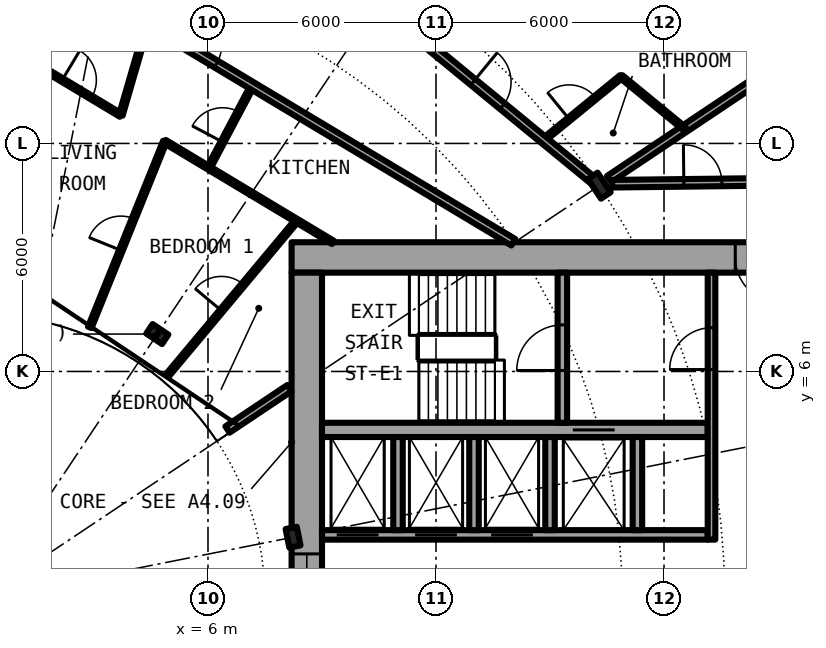
"""IFC4 building model, lengths in metres.
Left out: names, types, materials, properties, quantities, classifications, styles, units other than length and angle.
Written with IfcOpenShell. Run it as: python <this file> out.ifc"""

import sys

from ifc_helpers import new_model, si_unit, direction, frame, frame_2d, origin, origin_2d, place, context, subcontext, project, spatial, rectangle, i_section, extrude, element, fill, save


model = new_model("IFC4")
c1 = context("Model", 3, precision=1e-05, world=origin(), true_north=direction((0.0, 1.0)))
c2 = subcontext(c1, "Body", "Model", "MODEL_VIEW")
j1 = project(units=[si_unit("LENGTHUNIT", "METRE"), si_unit("PLANEANGLEUNIT", "RADIAN")], contexts=[c1])
p1 = place(None, origin())
s1 = spatial("IfcSite", under=j1, at=p1, CompositionType="ELEMENT")
p2 = place(p1, origin())
s2 = spatial("IfcBuilding", under=s1, at=p2, CompositionType="ELEMENT")
p3 = place(p2, frame((0.0, 0.0, 50.25)))
s3 = spatial("IfcBuildingStorey", under=s2, at=p3, CompositionType="ELEMENT", Elevation=50.25)
p4 = place(p3, frame((16.297, 10.889, 0.0), z_axis=(0.0, 0.0, 1.0), x_axis=(0.831469612303, 0.55557023302, 0.0)))
e1 = element("IfcColumn", 1, at=p4, inside=s3, PredefinedType="COLUMN", context=c2, shape_type="SweptSolid", body=[
    extrude(i_section(OverallWidth=0.305, OverallDepth=0.62, WebThickness=0.021, FlangeThickness=0.04, FilletRadius=0.027, at=origin_2d()), origin(), (0.0, 0.0, 1.0), 3.05),
])
for number, where, z_axis, x_axis in (
    (2, (8.239, 1.639, 0.0), (0.0, 0.0, 1.0), (0.981, 0.195, 0.0)),
    (3, (4.667, 6.984, 0.0), (0.0, 0.0, 1.0), (0.556, 0.831, 0.0)),
):
    element("IfcColumn", number, at=place(p3, frame(where, z_axis=z_axis, x_axis=x_axis)), inside=s3, PredefinedType="COLUMN", context=c2, shape_type="SweptSolid", body=[
        extrude(i_section(OverallWidth=0.3, OverallDepth=0.5, WebThickness=0.014, FlangeThickness=0.028, FilletRadius=0.027, at=origin_2d()), origin(), (0.0, 0.0, 1.0), 3.05),
    ])
p5 = place(p3, frame((22.4, 9.0, 0.0), z_axis=(0.0, 0.0, 1.0), x_axis=(-1.0, 0.0, 0.0)))
e4 = element("IfcWall", 4, at=p5, inside=s3, PredefinedType="SHEAR", context=c2, shape_type="SweptSolid", body=[
    extrude(rectangle(XDim=14.2, YDim=0.8, at=frame_2d((7.1, 0.0))), origin(), (0.0, 0.0, 1.0), 3.05),
])
p6 = place(p5, frame((1.325, 0.0, 0.0)))
e5 = element("IfcOpeningElement", 5, at=p6, cuts=e4, PredefinedType="OPENING", context=c2, shape_type="SweptSolid", body=[
    extrude(rectangle(XDim=1.2, YDim=2.3, at=frame_2d((0.6, 1.15))), frame((0.0, 0.41, 0.0), z_axis=(0.0, -1.0, 0.0), x_axis=(1.0, 0.0, 0.0)), (0.0, 0.0, 1.0), 0.82),
])
p7 = place(p3, frame((8.6, -8.6, 0.0), z_axis=(0.0, 0.0, 1.0), x_axis=(0.0, 1.0, 0.0)))
e6 = element("IfcWall", 6, at=p7, inside=s3, PredefinedType="SHEAR", context=c2, shape_type="SweptSolid", body=[
    extrude(rectangle(XDim=17.2, YDim=0.8, at=frame_2d((8.6, 0.0))), origin(), (0.0, 0.0, 1.0), 3.05),
])
p8 = place(p7, frame((7.4, 0.0, 0.1)))
e7 = element("IfcOpeningElement", 7, at=p8, cuts=e6, PredefinedType="OPENING", context=c2, shape_type="SweptSolid", body=[
    extrude(rectangle(XDim=2.4, YDim=2.2, at=frame_2d((1.2, 1.1))), frame((0.0, 0.41, 0.0), z_axis=(0.0, -1.0, 0.0), x_axis=(1.0, 0.0, 0.0)), (0.0, 0.0, 1.0), 0.82),
])
p9 = place(p3, frame((9.0, 1.7, 0.0), z_axis=(0.0, 0.0, 1.0), x_axis=(1.0, 0.0, 0.0)))
e8 = element("IfcWall", 8, at=p9, inside=s3, PredefinedType="SHEAR", context=c2, shape_type="SweptSolid", body=[
    extrude(rectangle(XDim=10.15, YDim=0.25, at=frame_2d((5.075, 0.0))), origin(), (0.0, 0.0, 1.0), 3.05),
])
p10 = place(p9, frame((0.387, 0.0, 0.0)))
e9 = element("IfcOpeningElement", 9, at=p10, cuts=e8, PredefinedType="OPENING", context=c2, shape_type="SweptSolid", body=[
    extrude(rectangle(XDim=1.1, YDim=2.3, at=frame_2d((0.55, 1.15))), frame((0.0, 0.135, 0.0), z_axis=(0.0, -1.0, 0.0), x_axis=(1.0, 0.0, 0.0)), (0.0, 0.0, 1.0), 0.27),
])
p11 = place(p9, frame((2.45, 0.0, 0.0)))
e10 = element("IfcOpeningElement", 10, at=p11, cuts=e8, PredefinedType="OPENING", context=c2, shape_type="SweptSolid", body=[
    extrude(rectangle(XDim=1.1, YDim=2.3, at=frame_2d((0.55, 1.15))), frame((0.0, 0.135, 0.0), z_axis=(0.0, -1.0, 0.0), x_axis=(1.0, 0.0, 0.0)), (0.0, 0.0, 1.0), 0.27),
])
p12 = place(p9, frame((4.45, 0.0, 0.0)))
e11 = element("IfcOpeningElement", 11, at=p12, cuts=e8, PredefinedType="OPENING", context=c2, shape_type="SweptSolid", body=[
    extrude(rectangle(XDim=1.1, YDim=2.3, at=frame_2d((0.55, 1.15))), frame((0.0, 0.135, 0.0), z_axis=(0.0, -1.0, 0.0), x_axis=(1.0, 0.0, 0.0)), (0.0, 0.0, 1.0), 0.27),
])
p13 = place(p3, frame((9.0, 4.462, 0.0), z_axis=(0.0, 0.0, 1.0), x_axis=(1.0, 0.0, 0.0)))
e12 = element("IfcWall", 12, at=p13, inside=s3, PredefinedType="SHEAR", context=c2, shape_type="SweptSolid", body=[
    extrude(rectangle(XDim=10.15, YDim=0.375, at=frame_2d((5.075, 0.0))), origin(), (0.0, 0.0, 1.0), 3.05),
])
p14 = place(p13, frame((6.6, 0.0, 0.0)))
e13 = element("IfcOpeningElement", 13, at=p14, cuts=e12, PredefinedType="OPENING", context=c2, shape_type="SweptSolid", body=[
    extrude(rectangle(XDim=1.1, YDim=2.3, at=frame_2d((0.55, 1.15))), frame((0.0, 0.198, 0.0), z_axis=(0.0, -1.0, 0.0), x_axis=(1.0, 0.0, 0.0)), (0.0, 0.0, 1.0), 0.395),
])
p15 = place(p3, frame((15.325, 4.65, 0.0), z_axis=(0.0, 0.0, 1.0), x_axis=(0.0, 1.0, 0.0)))
e14 = element("IfcWall", 14, at=p15, inside=s3, PredefinedType="SHEAR", context=c2, shape_type="SweptSolid", body=[
    extrude(rectangle(XDim=3.95, YDim=0.25, at=frame_2d((1.975, 0.0))), origin(), (0.0, 0.0, 1.0), 3.05),
])
p16 = place(p15, frame((1.375, 0.0, 0.0)))
e15 = element("IfcOpeningElement", 15, at=p16, cuts=e14, PredefinedType="OPENING", context=c2, shape_type="SweptSolid", body=[
    extrude(rectangle(XDim=1.2, YDim=2.3, at=frame_2d((0.6, 1.15))), frame((0.0, 0.135, 0.0), z_axis=(0.0, -1.0, 0.0), x_axis=(1.0, 0.0, 0.0)), (0.0, 0.0, 1.0), 0.27),
])
for number, where, z_axis, x_axis in (
    (16, (15.0, 1.825, 0.0), (0.0, 0.0, 1.0), (0.0, 1.0, 0.0)),
    (17, (17.3, 1.825, 0.0), (0.0, 0.0, 1.0), (0.0, 1.0, 0.0)),
):
    element("IfcWall", number, at=place(p3, frame(where, z_axis=z_axis, x_axis=x_axis)), inside=s3, PredefinedType="SOLIDWALL", context=c2, shape_type="SweptSolid", body=[
        extrude(rectangle(XDim=2.45, YDim=0.25, at=frame_2d((1.225, 0.0))), origin(), (0.0, 0.0, 1.0), 2.7),
    ])
p17 = place(p3, frame((19.25, 1.575, 0.0), z_axis=(0.0, 0.0, 1.0), x_axis=(0.0, 1.0, 0.0)))
e18 = element("IfcWall", 18, at=p17, inside=s3, PredefinedType="SOLIDWALL", context=c2, shape_type="SweptSolid", body=[
    extrude(rectangle(XDim=7.025, YDim=0.2, at=frame_2d((3.513, 0.0))), origin(), (0.0, 0.0, 1.0), 2.7),
])
p18 = place(p17, frame((4.475, 0.0, 0.0)))
e19 = element("IfcOpeningElement", 19, at=p18, cuts=e18, PredefinedType="OPENING", context=c2, shape_type="SweptSolid", body=[
    extrude(rectangle(XDim=1.1, YDim=2.3, at=frame_2d((0.55, 1.15))), frame((0.0, 0.11, 0.0), z_axis=(0.0, -1.0, 0.0), x_axis=(1.0, 0.0, 0.0)), (0.0, 0.0, 1.0), 0.22),
])
for number, where, z_axis, x_axis in (
    (20, (11.0, 1.825, 0.0), (0.0, 0.0, 1.0), (0.0, 1.0, 0.0)),
    (21, (13.0, 1.825, 0.0), (0.0, 0.0, 1.0), (0.0, 1.0, 0.0)),
):
    element("IfcWall", number, at=place(p3, frame(where, z_axis=z_axis, x_axis=x_axis)), inside=s3, PredefinedType="SOLIDWALL", context=c2, shape_type="SweptSolid", body=[
        extrude(rectangle(XDim=2.45, YDim=0.25, at=frame_2d((1.225, 0.0))), origin(), (0.0, 0.0, 1.0), 2.7),
    ])
p19 = place(p3, frame((2.889, 7.159, 0.0), z_axis=(0.0, 0.0, 1.0), x_axis=(0.374372761824, 0.927278294367, 0.0)))
e22 = element("IfcWall", 22, at=p19, inside=s3, PredefinedType="PARTITIONING", context=c2, shape_type="SweptSolid", body=[
    extrude(rectangle(XDim=5.276, YDim=0.1, at=frame_2d((2.638, 0.0))), origin(), (0.0, 0.0, 1.0), 2.7),
])
p20 = place(p19, frame((2.188, 0.0, 0.0)))
e23 = element("IfcOpeningElement", 23, at=p20, cuts=e22, PredefinedType="OPENING", context=c2, shape_type="SweptSolid", body=[
    extrude(rectangle(XDim=0.9, YDim=2.3, at=frame_2d((0.45, 1.15))), frame((0.0, 0.06, 0.0), z_axis=(0.0, -1.0, 0.0), x_axis=(1.0, 0.0, 0.0)), (0.0, 0.0, 1.0), 0.12),
])
p21 = place(p3, frame((3.706, 12.744, 0.0), z_axis=(0.0, 0.0, 1.0), x_axis=(0.279201466266, 0.960232545395, 0.0)))
e24 = element("IfcWall", 24, at=p21, inside=s3, PredefinedType="PARTITIONING", context=c2, shape_type="SweptSolid", body=[
    extrude(rectangle(XDim=2.524, YDim=0.1, at=frame_2d((1.262, 0.0))), origin(), (0.0, 0.0, 1.0), 2.7),
])
p22 = place(p3, frame((4.952, 5.923, 0.0), z_axis=(0.0, 0.0, 1.0), x_axis=(0.641376424834, 0.767226356213, 0.0)))
e25 = element("IfcWall", 25, at=p22, inside=s3, PredefinedType="PARTITIONING", context=c2, shape_type="SweptSolid", body=[
    extrude(rectangle(XDim=5.275, YDim=0.1, at=frame_2d((2.637, 0.0))), origin(), (0.0, 0.0, 1.0), 2.7),
])
p23 = place(p22, frame((2.187, 0.0, 0.0)))
e26 = element("IfcOpeningElement", 26, at=p23, cuts=e25, PredefinedType="OPENING", context=c2, shape_type="SweptSolid", body=[
    extrude(rectangle(XDim=0.9, YDim=2.3, at=frame_2d((0.45, 1.15))), frame((0.0, 0.06, 0.0), z_axis=(0.0, -1.0, 0.0), x_axis=(1.0, 0.0, 0.0)), (0.0, 0.0, 1.0), 0.12),
])
p24 = place(p3, frame((6.021, 11.357, 0.0), z_axis=(0.0, 0.0, 1.0), x_axis=(0.468337293896, 0.883549760425, 0.0)))
e27 = element("IfcWall", 27, at=p24, inside=s3, PredefinedType="PARTITIONING", context=c2, shape_type="SweptSolid", body=[
    extrude(rectangle(XDim=2.445, YDim=0.1, at=frame_2d((1.222, 0.0))), origin(), (0.0, 0.0, 1.0), 2.7),
])
p25 = place(p24, frame((0.772, 0.0, 0.0)))
e28 = element("IfcOpeningElement", 28, at=p25, cuts=e27, PredefinedType="OPENING", context=c2, shape_type="SweptSolid", body=[
    extrude(rectangle(XDim=0.9, YDim=2.3, at=frame_2d((0.45, 1.15))), frame((0.0, 0.06, 0.0), z_axis=(0.0, -1.0, 0.0), x_axis=(1.0, 0.0, 0.0)), (0.0, 0.0, 1.0), 0.12),
])
p26 = place(p3, frame((14.831, 12.092, 0.0), z_axis=(0.0, 0.0, 1.0), x_axis=(0.774979608522, 0.631986239072, 0.0)))
e29 = element("IfcWall", 29, at=p26, inside=s3, PredefinedType="PARTITIONING", context=c2, shape_type="SweptSolid", body=[
    extrude(rectangle(XDim=2.636, YDim=0.1, at=frame_2d((1.318, 0.0))), origin(), (0.0, 0.0, 1.0), 2.7),
])
p27 = place(p26, frame((0.868, 0.0, 0.0)))
e30 = element("IfcOpeningElement", 30, at=p27, cuts=e29, PredefinedType="OPENING", context=c2, shape_type="SweptSolid", body=[
    extrude(rectangle(XDim=0.9, YDim=2.3, at=frame_2d((0.45, 1.15))), frame((0.0, 0.06, 0.0), z_axis=(0.0, -1.0, 0.0), x_axis=(1.0, 0.0, 0.0)), (0.0, 0.0, 1.0), 0.12),
])
p28 = place(p3, frame((16.555, 11.061, 0.0), z_axis=(0.0, 0.0, 1.0), x_axis=(0.831403467378, 0.55566921314, 0.0)))
e31 = element("IfcWall", 31, at=p28, inside=s3, PredefinedType="PARTITIONING", context=c2, shape_type="SweptSolid", body=[
    extrude(rectangle(XDim=7.265, YDim=0.2, at=frame_2d((3.632, 0.0))), origin(), (0.0, 0.0, 1.0), 2.7),
])
p29 = place(p3, frame((6.513, 4.472, 0.0), z_axis=(0.0, 0.0, 1.0), x_axis=(0.831417956244, 0.555647533996, 0.0)))
e32 = element("IfcWall", 32, at=p29, inside=s3, PredefinedType="PARTITIONING", context=c2, shape_type="SweptSolid", body=[
    extrude(rectangle(XDim=1.962, YDim=0.2, at=frame_2d((0.981, 0.0))), origin(), (0.0, 0.0, 1.0), 2.7),
])
p30 = place(p3, frame((16.636, 10.94, 0.0), z_axis=(0.0, 0.0, 1.0), x_axis=(0.999928980998, 0.011917758204, 0.0)))
e33 = element("IfcWall", 33, at=p30, inside=s3, PredefinedType="PARTITIONING", context=c2, shape_type="SweptSolid", body=[
    extrude(rectangle(XDim=5.039, YDim=0.2, at=frame_2d((2.52, 0.0))), origin(), (0.0, 0.0, 1.0), 2.7),
])
p31 = place(p30, frame((1.886, 0.0, 0.0)))
e34 = element("IfcOpeningElement", 34, at=p31, cuts=e33, PredefinedType="OPENING", context=c2, shape_type="SweptSolid", body=[
    extrude(rectangle(XDim=1.0, YDim=2.3, at=frame_2d((0.5, 1.15))), frame((0.0, 0.11, 0.0), z_axis=(0.0, -1.0, 0.0), x_axis=(1.0, 0.0, 0.0)), (0.0, 0.0, 1.0), 0.22),
])
p32 = place(p3, frame((1.392, 14.132, 0.0), z_axis=(0.0, 0.0, 1.0), x_axis=(0.857524856518, -0.514442533674, 0.0)))
e35 = element("IfcWall", 35, at=p32, inside=s3, PredefinedType="PARTITIONING", context=c2, shape_type="SweptSolid", body=[
    extrude(rectangle(XDim=2.698, YDim=0.1, at=frame_2d((1.349, 0.0))), origin(), (0.0, 0.0, 1.0), 2.7),
])
p33 = place(p32, frame((0.899, 0.0, 0.0)))
e36 = element("IfcOpeningElement", 36, at=p33, cuts=e35, PredefinedType="OPENING", context=c2, shape_type="SweptSolid", body=[
    extrude(rectangle(XDim=0.9, YDim=2.3, at=frame_2d((0.45, 1.15))), frame((0.0, 0.06, 0.0), z_axis=(0.0, -1.0, 0.0), x_axis=(1.0, 0.0, 0.0)), (0.0, 0.0, 1.0), 0.12),
])
p34 = place(p3, frame((4.863, 12.05, 0.0), z_axis=(0.0, 0.0, 1.0), x_axis=(0.857576410704, -0.51435658818, 0.0)))
e37 = element("IfcWall", 37, at=p34, inside=s3, PredefinedType="PARTITIONING", context=c2, shape_type="SweptSolid", body=[
    extrude(rectangle(XDim=5.16, YDim=0.1, at=frame_2d((2.58, 0.0))), origin(), (0.0, 0.0, 1.0), 2.7),
])
p35 = place(p3, frame((1.658, 16.819, 0.0), z_axis=(0.0, 0.0, 1.0), x_axis=(0.857688434449, -0.514169767113, 0.0)))
e38 = element("IfcWall", 38, at=p35, inside=s3, PredefinedType="PARTITIONING", context=c2, shape_type="SweptSolid", body=[
    extrude(rectangle(XDim=14.429, YDim=0.2, at=frame_2d((7.215, 0.0))), origin(), (0.0, 0.0, 1.0), 2.7),
])
p36 = place(p35, frame((4.316, 0.0, 0.0)))
e39 = element("IfcOpeningElement", 39, at=p36, cuts=e38, PredefinedType="OPENING", context=c2, shape_type="SweptSolid", body=[
    extrude(rectangle(XDim=1.0, YDim=2.3, at=frame_2d((0.5, 1.15))), frame((0.0, 0.11, 0.0), z_axis=(0.0, -1.0, 0.0), x_axis=(1.0, 0.0, 0.0)), (0.0, 0.0, 1.0), 0.22),
])
p37 = place(p3, frame((7.5, 18.108, 0.0), z_axis=(0.0, 0.0, 1.0), x_axis=(0.773041360816, -0.634355621452, 0.0)))
e40 = element("IfcWall", 40, at=p37, inside=s3, PredefinedType="PARTITIONING", context=c2, shape_type="SweptSolid", body=[
    extrude(rectangle(XDim=11.221, YDim=0.2, at=frame_2d((5.61, 0.0))), origin(), (0.0, 0.0, 1.0), 2.38),
])
p38 = place(p37, frame((7.083, 0.0, 0.0)))
e41 = element("IfcOpeningElement", 41, at=p38, cuts=e40, PredefinedType="OPENING", context=c2, shape_type="SweptSolid", body=[
    extrude(rectangle(XDim=1.0, YDim=2.3, at=frame_2d((0.5, 1.15))), frame((0.0, 0.11, 0.0), z_axis=(0.0, -1.0, 0.0), x_axis=(1.0, 0.0, 0.0)), (0.0, 0.0, 1.0), 0.22),
])
p39 = place(p3, frame((16.874, 13.758, 0.0), z_axis=(0.0, 0.0, 1.0), x_axis=(0.772948171844, -0.634469166818, 0.0)))
e42 = element("IfcWall", 42, at=p39, inside=s3, PredefinedType="PARTITIONING", context=c2, shape_type="SweptSolid", body=[
    extrude(rectangle(XDim=2.158, YDim=0.1, at=frame_2d((1.079, 0.0))), origin(), (0.0, 0.0, 1.0), 2.7),
])
p40 = place(p10, origin())
e43 = element("IfcDoor", 43, at=p40, inside=s3, OperationType="DOUBLE_DOOR_SLIDING", PredefinedType="DOOR", context=c2, shape_type="SweptSolid", body=[
    extrude(rectangle(XDim=1.1, YDim=2.3, at=frame_2d((0.55, 1.15))), frame((0.0, 0.025, 0.0), z_axis=(0.0, -1.0, 0.0), x_axis=(1.0, 0.0, 0.0)), (0.0, 0.0, 1.0), 0.05),
])
fill(e9, e43)
p41 = place(p11, origin())
e44 = element("IfcDoor", 44, at=p41, inside=s3, OperationType="DOUBLE_DOOR_SLIDING", PredefinedType="DOOR", context=c2, shape_type="SweptSolid", body=[
    extrude(rectangle(XDim=1.1, YDim=2.3, at=frame_2d((0.55, 1.15))), frame((0.0, 0.025, 0.0), z_axis=(0.0, -1.0, 0.0), x_axis=(1.0, 0.0, 0.0)), (0.0, 0.0, 1.0), 0.05),
])
fill(e10, e44)
p42 = place(p12, origin())
e45 = element("IfcDoor", 45, at=p42, inside=s3, OperationType="DOUBLE_DOOR_SLIDING", PredefinedType="DOOR", context=c2, shape_type="SweptSolid", body=[
    extrude(rectangle(XDim=1.1, YDim=2.3, at=frame_2d((0.55, 1.15))), frame((0.0, 0.025, 0.0), z_axis=(0.0, -1.0, 0.0), x_axis=(1.0, 0.0, 0.0)), (0.0, 0.0, 1.0), 0.05),
])
fill(e11, e45)
p43 = place(p14, origin())
e46 = element("IfcDoor", 46, at=p43, inside=s3, OperationType="DOUBLE_DOOR_SLIDING", PredefinedType="DOOR", context=c2, shape_type="SweptSolid", body=[
    extrude(rectangle(XDim=1.1, YDim=2.3, at=frame_2d((0.55, 1.15))), frame((0.0, 0.025, 0.0), z_axis=(0.0, -1.0, 0.0), x_axis=(1.0, 0.0, 0.0)), (0.0, 0.0, 1.0), 0.05),
])
fill(e13, e46)
p44 = place(p16, origin())
e47 = element("IfcDoor", 47, at=p44, inside=s3, OperationType="SINGLE_SWING_LEFT", PredefinedType="DOOR", context=c2, shape_type="SweptSolid", body=[
    extrude(rectangle(XDim=1.2, YDim=2.3, at=frame_2d((0.6, 1.15))), frame((0.0, 0.025, 0.0), z_axis=(0.0, -1.0, 0.0), x_axis=(1.0, 0.0, 0.0)), (0.0, 0.0, 1.0), 0.05),
])
fill(e15, e47)
p45 = place(p18, origin())
e48 = element("IfcDoor", 48, at=p45, inside=s3, OperationType="SINGLE_SWING_LEFT", PredefinedType="DOOR", context=c2, shape_type="SweptSolid", body=[
    extrude(rectangle(XDim=1.1, YDim=2.3, at=frame_2d((0.55, 1.15))), frame((0.0, 0.025, 0.0), z_axis=(0.0, -1.0, 0.0), x_axis=(1.0, 0.0, 0.0)), (0.0, 0.0, 1.0), 0.05),
])
fill(e19, e48)
p46 = place(p6, origin())
e49 = element("IfcDoor", 49, at=p46, inside=s3, OperationType="SINGLE_SWING_RIGHT", PredefinedType="DOOR", context=c2, shape_type="SweptSolid", body=[
    extrude(rectangle(XDim=1.2, YDim=2.3, at=frame_2d((0.6, 1.15))), frame((0.0, 0.025, 0.0), z_axis=(0.0, -1.0, 0.0), x_axis=(1.0, 0.0, 0.0)), (0.0, 0.0, 1.0), 0.05),
])
fill(e5, e49)
p47 = place(p8, origin())
e50 = element("IfcWindow", 50, at=p47, inside=s3, PartitioningType="SINGLE_PANEL", PredefinedType="WINDOW", context=c2, shape_type="SweptSolid", body=[
    extrude(rectangle(XDim=2.4, YDim=2.2, at=frame_2d((1.2, 1.1))), frame((0.0, 0.03, 0.0), z_axis=(0.0, -1.0, 0.0), x_axis=(1.0, 0.0, 0.0)), (0.0, 0.0, 1.0), 0.06),
])
fill(e7, e50)
p48 = place(p38, origin())
e51 = element("IfcDoor", 51, at=p48, inside=s3, OperationType="SINGLE_SWING_RIGHT", PredefinedType="DOOR", context=c2, shape_type="SweptSolid", body=[
    extrude(rectangle(XDim=1.0, YDim=2.3, at=frame_2d((0.5, 1.15))), frame((0.0, 0.025, 0.0), z_axis=(0.0, -1.0, 0.0), x_axis=(1.0, 0.0, 0.0)), (0.0, 0.0, 1.0), 0.05),
])
fill(e41, e51)
p49 = place(p27, origin())
e52 = element("IfcDoor", 52, at=p49, inside=s3, OperationType="SINGLE_SWING_RIGHT", PredefinedType="DOOR", context=c2, shape_type="SweptSolid", body=[
    extrude(rectangle(XDim=0.9, YDim=2.3, at=frame_2d((0.45, 1.15))), frame((0.0, 0.025, 0.0), z_axis=(0.0, -1.0, 0.0), x_axis=(1.0, 0.0, 0.0)), (0.0, 0.0, 1.0), 0.05),
])
fill(e30, e52)
p50 = place(p36, origin())
e53 = element("IfcDoor", 53, at=p50, inside=s3, OperationType="SINGLE_SWING_LEFT", PredefinedType="DOOR", context=c2, shape_type="SweptSolid", body=[
    extrude(rectangle(XDim=1.0, YDim=2.3, at=frame_2d((0.5, 1.15))), frame((0.0, 0.025, 0.0), z_axis=(0.0, -1.0, 0.0), x_axis=(1.0, 0.0, 0.0)), (0.0, 0.0, 1.0), 0.05),
])
fill(e39, e53)
p51 = place(p33, origin())
e54 = element("IfcDoor", 54, at=p51, inside=s3, OperationType="SINGLE_SWING_RIGHT", PredefinedType="DOOR", context=c2, shape_type="SweptSolid", body=[
    extrude(rectangle(XDim=0.9, YDim=2.3, at=frame_2d((0.45, 1.15))), frame((0.0, 0.025, 0.0), z_axis=(0.0, -1.0, 0.0), x_axis=(1.0, 0.0, 0.0)), (0.0, 0.0, 1.0), 0.05),
])
fill(e36, e54)
p52 = place(p25, origin())
e55 = element("IfcDoor", 55, at=p52, inside=s3, OperationType="SINGLE_SWING_RIGHT", PredefinedType="DOOR", context=c2, shape_type="SweptSolid", body=[
    extrude(rectangle(XDim=0.9, YDim=2.3, at=frame_2d((0.45, 1.15))), frame((0.0, 0.025, 0.0), z_axis=(0.0, -1.0, 0.0), x_axis=(1.0, 0.0, 0.0)), (0.0, 0.0, 1.0), 0.05),
])
fill(e28, e55)
p53 = place(p20, origin())
e56 = element("IfcDoor", 56, at=p53, inside=s3, OperationType="SINGLE_SWING_RIGHT", PredefinedType="DOOR", context=c2, shape_type="SweptSolid", body=[
    extrude(rectangle(XDim=0.9, YDim=2.3, at=frame_2d((0.45, 1.15))), frame((0.0, 0.025, 0.0), z_axis=(0.0, -1.0, 0.0), x_axis=(1.0, 0.0, 0.0)), (0.0, 0.0, 1.0), 0.05),
])
fill(e23, e56)
p54 = place(p23, origin())
e57 = element("IfcDoor", 57, at=p54, inside=s3, OperationType="SINGLE_SWING_RIGHT", PredefinedType="DOOR", context=c2, shape_type="SweptSolid", body=[
    extrude(rectangle(XDim=0.9, YDim=2.3, at=frame_2d((0.45, 1.15))), frame((0.0, 0.025, 0.0), z_axis=(0.0, -1.0, 0.0), x_axis=(1.0, 0.0, 0.0)), (0.0, 0.0, 1.0), 0.05),
])
fill(e26, e57)
p55 = place(p31, origin())
e58 = element("IfcDoor", 58, at=p55, inside=s3, OperationType="SINGLE_SWING_LEFT", PredefinedType="DOOR", context=c2, shape_type="SweptSolid", body=[
    extrude(rectangle(XDim=1.0, YDim=2.3, at=frame_2d((0.5, 1.15))), frame((0.0, 0.025, 0.0), z_axis=(0.0, -1.0, 0.0), x_axis=(1.0, 0.0, 0.0)), (0.0, 0.0, 1.0), 0.05),
])
fill(e34, e58)
save(model, sys.argv[1])
